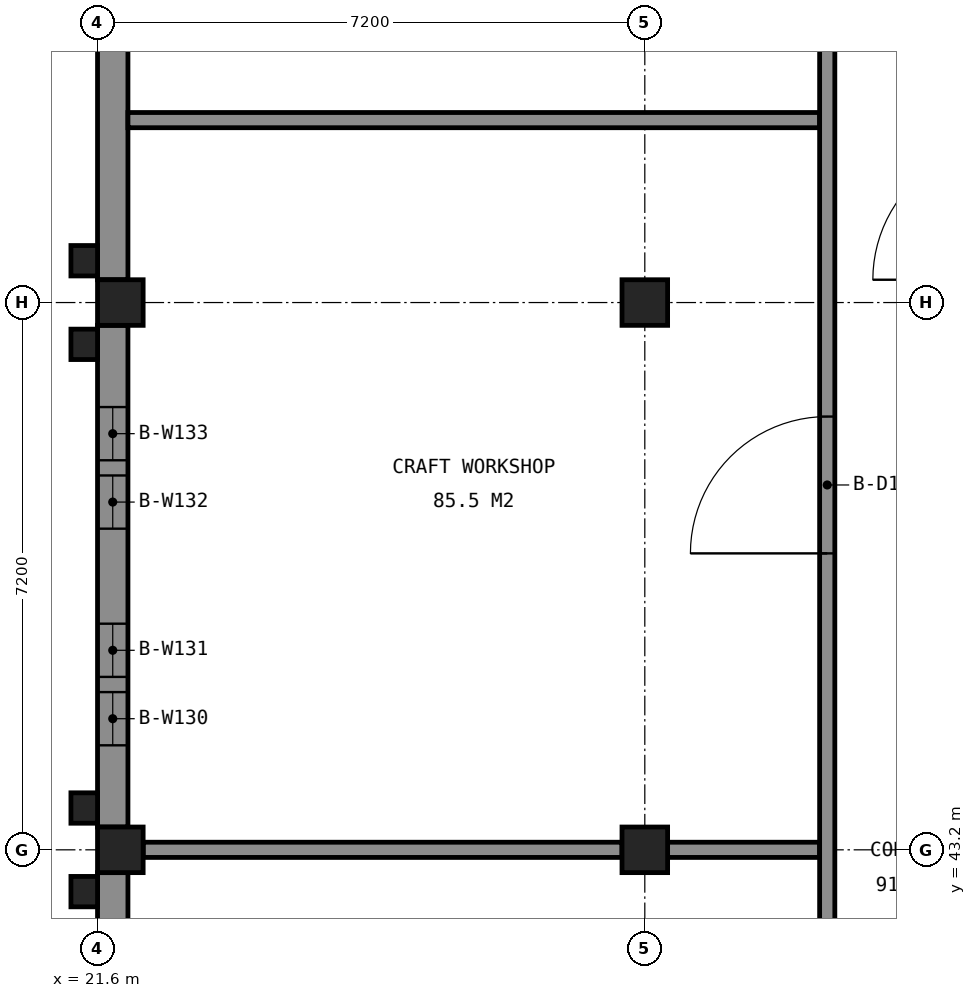
"""IFC4 building model, lengths in metres.
Left out: names, types, materials, properties, quantities, classifications, styles, units other than length and angle.
Written with IfcOpenShell. Run it as: python <this file> out.ifc"""

import sys

from ifc_helpers import new_model, si_unit, direction, frame, frame_2d, origin, origin_2d, place, context, subcontext, project, spatial, rectangle, extrude, element, fill, save


model = new_model("IFC4")
c1 = context("Model", 3, precision=1e-05, world=origin(), true_north=direction((0.0, 1.0)))
c2 = subcontext(c1, "Body", "Model", "MODEL_VIEW")
j1 = project(units=[si_unit("LENGTHUNIT", "METRE"), si_unit("PLANEANGLEUNIT", "RADIAN")], contexts=[c1])
p1 = place(None, origin())
s1 = spatial("IfcSite", under=j1, at=p1, CompositionType="ELEMENT")
p2 = place(p1, origin())
s2 = spatial("IfcBuilding", under=s1, at=p2, CompositionType="ELEMENT")
p3 = place(p2, frame((0.0, 0.0, 9.6)))
s3 = spatial("IfcBuildingStorey", under=s2, at=p3, CompositionType="ELEMENT", Elevation=9.6)
for number, where, z_axis, x_axis in (
    (1, (21.9, 43.2, 0.0), (0.0, 0.0, 1.0), (1.0, 0.0, 0.0)),
    (2, (21.9, 50.4, 0.0), (0.0, 0.0, 1.0), (1.0, 0.0, 0.0)),
    (3, (28.8, 43.2, 0.0), (0.0, 0.0, 1.0), (1.0, 0.0, 0.0)),
    (4, (28.8, 50.4, 0.0), (0.0, 0.0, 1.0), (1.0, 0.0, 0.0)),
):
    element("IfcColumn", number, at=place(p3, frame(where, z_axis=z_axis, x_axis=x_axis)), inside=s3, PredefinedType="COLUMN", context=c2, shape_type="SweptSolid", body=[
        extrude(rectangle(XDim=0.6, YDim=0.6, at=origin_2d()), origin(), (0.0, 0.0, 1.0), 4.8),
    ])
p4 = place(p3, frame((21.8, 36.3, 0.0), z_axis=(0.0, 0.0, 1.0), x_axis=(0.0, 1.0, 0.0)))
e5 = element("IfcWall", 5, at=p4, inside=s3, PredefinedType="SOLIDWALL", context=c2, shape_type="SweptSolid", body=[
    extrude(rectangle(XDim=6.6, YDim=0.4, at=frame_2d((3.3, 0.0))), origin(), (0.0, 0.0, 1.0), 3.95),
])
p5 = place(p4, frame((1.075, 0.0, 0.9)))
e6 = element("IfcOpeningElement", 6, at=p5, cuts=e5, PredefinedType="OPENING", context=c2, shape_type="SweptSolid", body=[
    extrude(rectangle(XDim=0.7, YDim=2.4, at=frame_2d((0.35, 1.2))), frame((0.0, 0.21, 0.0), z_axis=(0.0, -1.0, 0.0), x_axis=(1.0, 0.0, 0.0)), (0.0, 0.0, 1.0), 0.42),
])
p6 = place(p4, frame((1.975, 0.0, 0.9)))
e7 = element("IfcOpeningElement", 7, at=p6, cuts=e5, PredefinedType="OPENING", context=c2, shape_type="SweptSolid", body=[
    extrude(rectangle(XDim=0.7, YDim=2.4, at=frame_2d((0.35, 1.2))), frame((0.0, 0.21, 0.0), z_axis=(0.0, -1.0, 0.0), x_axis=(1.0, 0.0, 0.0)), (0.0, 0.0, 1.0), 0.42),
])
p7 = place(p4, frame((3.925, 0.0, 0.9)))
e8 = element("IfcOpeningElement", 8, at=p7, cuts=e5, PredefinedType="OPENING", context=c2, shape_type="SweptSolid", body=[
    extrude(rectangle(XDim=0.7, YDim=2.4, at=frame_2d((0.35, 1.2))), frame((0.0, 0.21, 0.0), z_axis=(0.0, -1.0, 0.0), x_axis=(1.0, 0.0, 0.0)), (0.0, 0.0, 1.0), 0.42),
])
p8 = place(p4, frame((4.825, 0.0, 0.9)))
e9 = element("IfcOpeningElement", 9, at=p8, cuts=e5, PredefinedType="OPENING", context=c2, shape_type="SweptSolid", body=[
    extrude(rectangle(XDim=0.7, YDim=2.4, at=frame_2d((0.35, 1.2))), frame((0.0, 0.21, 0.0), z_axis=(0.0, -1.0, 0.0), x_axis=(1.0, 0.0, 0.0)), (0.0, 0.0, 1.0), 0.42),
])
p9 = place(p3, frame((21.8, 43.5, 0.0), z_axis=(0.0, 0.0, 1.0), x_axis=(0.0, 1.0, 0.0)))
e10 = element("IfcWall", 10, at=p9, inside=s3, PredefinedType="SOLIDWALL", context=c2, shape_type="SweptSolid", body=[
    extrude(rectangle(XDim=6.6, YDim=0.4, at=frame_2d((3.3, 0.0))), origin(), (0.0, 0.0, 1.0), 3.95),
])
p10 = place(p9, frame((1.075, 0.0, 0.9)))
e11 = element("IfcOpeningElement", 11, at=p10, cuts=e10, PredefinedType="OPENING", context=c2, shape_type="SweptSolid", body=[
    extrude(rectangle(XDim=0.7, YDim=2.4, at=frame_2d((0.35, 1.2))), frame((0.0, 0.21, 0.0), z_axis=(0.0, -1.0, 0.0), x_axis=(1.0, 0.0, 0.0)), (0.0, 0.0, 1.0), 0.42),
])
p11 = place(p9, frame((1.975, 0.0, 0.9)))
e12 = element("IfcOpeningElement", 12, at=p11, cuts=e10, PredefinedType="OPENING", context=c2, shape_type="SweptSolid", body=[
    extrude(rectangle(XDim=0.7, YDim=2.4, at=frame_2d((0.35, 1.2))), frame((0.0, 0.21, 0.0), z_axis=(0.0, -1.0, 0.0), x_axis=(1.0, 0.0, 0.0)), (0.0, 0.0, 1.0), 0.42),
])
p12 = place(p9, frame((3.925, 0.0, 0.9)))
e13 = element("IfcOpeningElement", 13, at=p12, cuts=e10, PredefinedType="OPENING", context=c2, shape_type="SweptSolid", body=[
    extrude(rectangle(XDim=0.7, YDim=2.4, at=frame_2d((0.35, 1.2))), frame((0.0, 0.21, 0.0), z_axis=(0.0, -1.0, 0.0), x_axis=(1.0, 0.0, 0.0)), (0.0, 0.0, 1.0), 0.42),
])
p13 = place(p9, frame((4.825, 0.0, 0.9)))
e14 = element("IfcOpeningElement", 14, at=p13, cuts=e10, PredefinedType="OPENING", context=c2, shape_type="SweptSolid", body=[
    extrude(rectangle(XDim=0.7, YDim=2.4, at=frame_2d((0.35, 1.2))), frame((0.0, 0.21, 0.0), z_axis=(0.0, -1.0, 0.0), x_axis=(1.0, 0.0, 0.0)), (0.0, 0.0, 1.0), 0.42),
])
p14 = place(p3, frame((21.8, 50.7, 0.0), z_axis=(0.0, 0.0, 1.0), x_axis=(0.0, 1.0, 0.0)))
e15 = element("IfcWall", 15, at=p14, inside=s3, PredefinedType="SOLIDWALL", context=c2, shape_type="SweptSolid", body=[
    extrude(rectangle(XDim=6.6, YDim=0.4, at=frame_2d((3.3, 0.0))), origin(), (0.0, 0.0, 1.0), 3.95),
])
p15 = place(p14, frame((3.625, 0.0, 0.9)))
e16 = element("IfcOpeningElement", 16, at=p15, cuts=e15, PredefinedType="OPENING", context=c2, shape_type="SweptSolid", body=[
    extrude(rectangle(XDim=0.7, YDim=2.4, at=frame_2d((0.35, 1.2))), frame((0.0, 0.21, 0.0), z_axis=(0.0, -1.0, 0.0), x_axis=(1.0, 0.0, 0.0)), (0.0, 0.0, 1.0), 0.42),
])
p16 = place(p14, frame((4.525, 0.0, 0.9)))
e17 = element("IfcOpeningElement", 17, at=p16, cuts=e15, PredefinedType="OPENING", context=c2, shape_type="SweptSolid", body=[
    extrude(rectangle(XDim=0.7, YDim=2.4, at=frame_2d((0.35, 1.2))), frame((0.0, 0.21, 0.0), z_axis=(0.0, -1.0, 0.0), x_axis=(1.0, 0.0, 0.0)), (0.0, 0.0, 1.0), 0.42),
])
for number, where, z_axis, x_axis in (
    (18, (21.425, 42.65, 0.0), (0.0, 0.0, 1.0), (1.0, 0.0, 0.0)),
    (19, (21.425, 43.75, 0.0), (0.0, 0.0, 1.0), (1.0, 0.0, 0.0)),
    (20, (21.425, 49.85, 0.0), (0.0, 0.0, 1.0), (1.0, 0.0, 0.0)),
    (21, (21.425, 50.95, 0.0), (0.0, 0.0, 1.0), (1.0, 0.0, 0.0)),
):
    element("IfcColumn", number, at=place(p3, frame(where, z_axis=z_axis, x_axis=x_axis)), inside=s3, PredefinedType="COLUMN", context=c2, shape_type="SweptSolid", body=[
        extrude(rectangle(XDim=0.35, YDim=0.4, at=origin_2d()), origin(), (0.0, 0.0, 1.0), 4.8),
    ])
p17 = place(p3, frame((21.525, 36.75, -0.15), z_axis=(0.0, 0.0, 1.0), x_axis=(0.0, 1.0, 0.0)))
e22 = element("IfcWall", 22, at=p17, inside=s3, PredefinedType="SOLIDWALL", context=c2, shape_type="SweptSolid", body=[
    extrude(rectangle(XDim=5.7, YDim=0.15, at=frame_2d((2.85, 0.0))), origin(), (0.0, 0.0, 1.0), 0.3),
])
p18 = place(p3, frame((21.525, 42.85, -0.15), z_axis=(0.0, 0.0, 1.0), x_axis=(0.0, 1.0, 0.0)))
e23 = element("IfcWall", 23, at=p18, inside=s3, PredefinedType="SOLIDWALL", context=c2, shape_type="SweptSolid", body=[
    extrude(rectangle(XDim=0.7, YDim=0.15, at=frame_2d((0.35, 0.0))), origin(), (0.0, 0.0, 1.0), 0.3),
])
p19 = place(p3, frame((21.525, 43.95, -0.15), z_axis=(0.0, 0.0, 1.0), x_axis=(0.0, 1.0, 0.0)))
e24 = element("IfcWall", 24, at=p19, inside=s3, PredefinedType="SOLIDWALL", context=c2, shape_type="SweptSolid", body=[
    extrude(rectangle(XDim=5.7, YDim=0.15, at=frame_2d((2.85, 0.0))), origin(), (0.0, 0.0, 1.0), 0.3),
])
p20 = place(p3, frame((21.525, 50.05, -0.15), z_axis=(0.0, 0.0, 1.0), x_axis=(0.0, 1.0, 0.0)))
e25 = element("IfcWall", 25, at=p20, inside=s3, PredefinedType="SOLIDWALL", context=c2, shape_type="SweptSolid", body=[
    extrude(rectangle(XDim=0.7, YDim=0.15, at=frame_2d((0.35, 0.0))), origin(), (0.0, 0.0, 1.0), 0.3),
])
p21 = place(p3, frame((21.525, 51.15, -0.15), z_axis=(0.0, 0.0, 1.0), x_axis=(0.0, 1.0, 0.0)))
e26 = element("IfcWall", 26, at=p21, inside=s3, PredefinedType="SOLIDWALL", context=c2, shape_type="SweptSolid", body=[
    extrude(rectangle(XDim=5.7, YDim=0.15, at=frame_2d((2.85, 0.0))), origin(), (0.0, 0.0, 1.0), 0.3),
])
p22 = place(p3, frame((22.2, 43.2, 0.0), z_axis=(0.0, 0.0, 1.0), x_axis=(1.0, 0.0, 0.0)))
e27 = element("IfcWall", 27, at=p22, inside=s3, PredefinedType="PARTITIONING", context=c2, shape_type="SweptSolid", body=[
    extrude(rectangle(XDim=6.3, YDim=0.2, at=frame_2d((3.15, 0.0))), origin(), (0.0, 0.0, 1.0), 3.95),
])
p23 = place(p3, frame((29.1, 43.2, 0.0), z_axis=(0.0, 0.0, 1.0), x_axis=(1.0, 0.0, 0.0)))
e28 = element("IfcWall", 28, at=p23, inside=s3, PredefinedType="PARTITIONING", context=c2, shape_type="SweptSolid", body=[
    extrude(rectangle(XDim=2.0, YDim=0.2, at=frame_2d((1.0, 0.0))), origin(), (0.0, 0.0, 1.0), 3.95),
])
p24 = place(p3, frame((22.0, 52.8, 0.0), z_axis=(0.0, 0.0, 1.0), x_axis=(1.0, 0.0, 0.0)))
e29 = element("IfcWall", 29, at=p24, inside=s3, PredefinedType="PARTITIONING", context=c2, shape_type="SweptSolid", body=[
    extrude(rectangle(XDim=9.1, YDim=0.2, at=frame_2d((4.55, 0.0))), origin(), (0.0, 0.0, 1.0), 3.95),
])
p25 = place(p3, frame((31.2, 29.2, 0.0), z_axis=(0.0, 0.0, 1.0), x_axis=(0.0, 1.0, 0.0)))
e30 = element("IfcWall", 30, at=p25, inside=s3, PredefinedType="PARTITIONING", context=c2, shape_type="SweptSolid", body=[
    extrude(rectangle(XDim=42.4, YDim=0.2, at=frame_2d((21.2, 0.0))), origin(), (0.0, 0.0, 1.0), 3.95),
])
p26 = place(p25, frame((2.7, 0.0, 0.0)))
e31 = element("IfcOpeningElement", 31, at=p26, cuts=e30, PredefinedType="OPENING", context=c2, shape_type="SweptSolid", body=[
    extrude(rectangle(XDim=1.0, YDim=2.1, at=frame_2d((0.5, 1.05))), frame((0.0, 0.11, 0.0), z_axis=(0.0, -1.0, 0.0), x_axis=(1.0, 0.0, 0.0)), (0.0, 0.0, 1.0), 0.22),
])
p27 = place(p25, frame((9.9, 0.0, 0.0)))
e32 = element("IfcOpeningElement", 32, at=p27, cuts=e30, PredefinedType="OPENING", context=c2, shape_type="SweptSolid", body=[
    extrude(rectangle(XDim=1.0, YDim=2.1, at=frame_2d((0.5, 1.05))), frame((0.0, 0.11, 0.0), z_axis=(0.0, -1.0, 0.0), x_axis=(1.0, 0.0, 0.0)), (0.0, 0.0, 1.0), 0.22),
])
p28 = place(p25, frame((17.9, 0.0, 0.0)))
e33 = element("IfcOpeningElement", 33, at=p28, cuts=e30, PredefinedType="OPENING", context=c2, shape_type="SweptSolid", body=[
    extrude(rectangle(XDim=1.8, YDim=2.1, at=frame_2d((0.9, 1.05))), frame((0.0, 0.11, 0.0), z_axis=(0.0, -1.0, 0.0), x_axis=(1.0, 0.0, 0.0)), (0.0, 0.0, 1.0), 0.22),
])
p29 = place(p25, frame((27.5, 0.0, 0.0)))
e34 = element("IfcOpeningElement", 34, at=p29, cuts=e30, PredefinedType="OPENING", context=c2, shape_type="SweptSolid", body=[
    extrude(rectangle(XDim=1.8, YDim=2.1, at=frame_2d((0.9, 1.05))), frame((0.0, 0.11, 0.0), z_axis=(0.0, -1.0, 0.0), x_axis=(1.0, 0.0, 0.0)), (0.0, 0.0, 1.0), 0.22),
])
p30 = place(p25, frame((37.1, 0.0, 0.0)))
e35 = element("IfcOpeningElement", 35, at=p30, cuts=e30, PredefinedType="OPENING", context=c2, shape_type="SweptSolid", body=[
    extrude(rectangle(XDim=1.8, YDim=2.1, at=frame_2d((0.9, 1.05))), frame((0.0, 0.11, 0.0), z_axis=(0.0, -1.0, 0.0), x_axis=(1.0, 0.0, 0.0)), (0.0, 0.0, 1.0), 0.22),
])
p31 = place(p10, origin())
e36 = element("IfcWindow", 36, at=p31, inside=s3, PartitioningType="SINGLE_PANEL", PredefinedType="WINDOW", context=c2, shape_type="SweptSolid", body=[
    extrude(rectangle(XDim=0.7, YDim=2.4, at=frame_2d((0.35, 1.2))), frame((0.0, 0.03, 0.0), z_axis=(0.0, -1.0, 0.0), x_axis=(1.0, 0.0, 0.0)), (0.0, 0.0, 1.0), 0.06),
])
fill(e11, e36)
p32 = place(p11, origin())
e37 = element("IfcWindow", 37, at=p32, inside=s3, PartitioningType="SINGLE_PANEL", PredefinedType="WINDOW", context=c2, shape_type="SweptSolid", body=[
    extrude(rectangle(XDim=0.7, YDim=2.4, at=frame_2d((0.35, 1.2))), frame((0.0, 0.03, 0.0), z_axis=(0.0, -1.0, 0.0), x_axis=(1.0, 0.0, 0.0)), (0.0, 0.0, 1.0), 0.06),
])
fill(e12, e37)
p33 = place(p12, origin())
e38 = element("IfcWindow", 38, at=p33, inside=s3, PartitioningType="SINGLE_PANEL", PredefinedType="WINDOW", context=c2, shape_type="SweptSolid", body=[
    extrude(rectangle(XDim=0.7, YDim=2.4, at=frame_2d((0.35, 1.2))), frame((0.0, 0.03, 0.0), z_axis=(0.0, -1.0, 0.0), x_axis=(1.0, 0.0, 0.0)), (0.0, 0.0, 1.0), 0.06),
])
fill(e13, e38)
p34 = place(p13, origin())
e39 = element("IfcWindow", 39, at=p34, inside=s3, PartitioningType="SINGLE_PANEL", PredefinedType="WINDOW", context=c2, shape_type="SweptSolid", body=[
    extrude(rectangle(XDim=0.7, YDim=2.4, at=frame_2d((0.35, 1.2))), frame((0.0, 0.03, 0.0), z_axis=(0.0, -1.0, 0.0), x_axis=(1.0, 0.0, 0.0)), (0.0, 0.0, 1.0), 0.06),
])
fill(e14, e39)
p35 = place(p28, origin())
e40 = element("IfcDoor", 40, at=p35, inside=s3, OperationType="DOUBLE_DOOR_DOUBLE_SWING", PredefinedType="DOOR", context=c2, shape_type="SweptSolid", body=[
    extrude(rectangle(XDim=1.8, YDim=2.1, at=frame_2d((0.9, 1.05))), frame((0.0, 0.025, 0.0), z_axis=(0.0, -1.0, 0.0), x_axis=(1.0, 0.0, 0.0)), (0.0, 0.0, 1.0), 0.05),
])
fill(e33, e40)
save(model, sys.argv[1])
